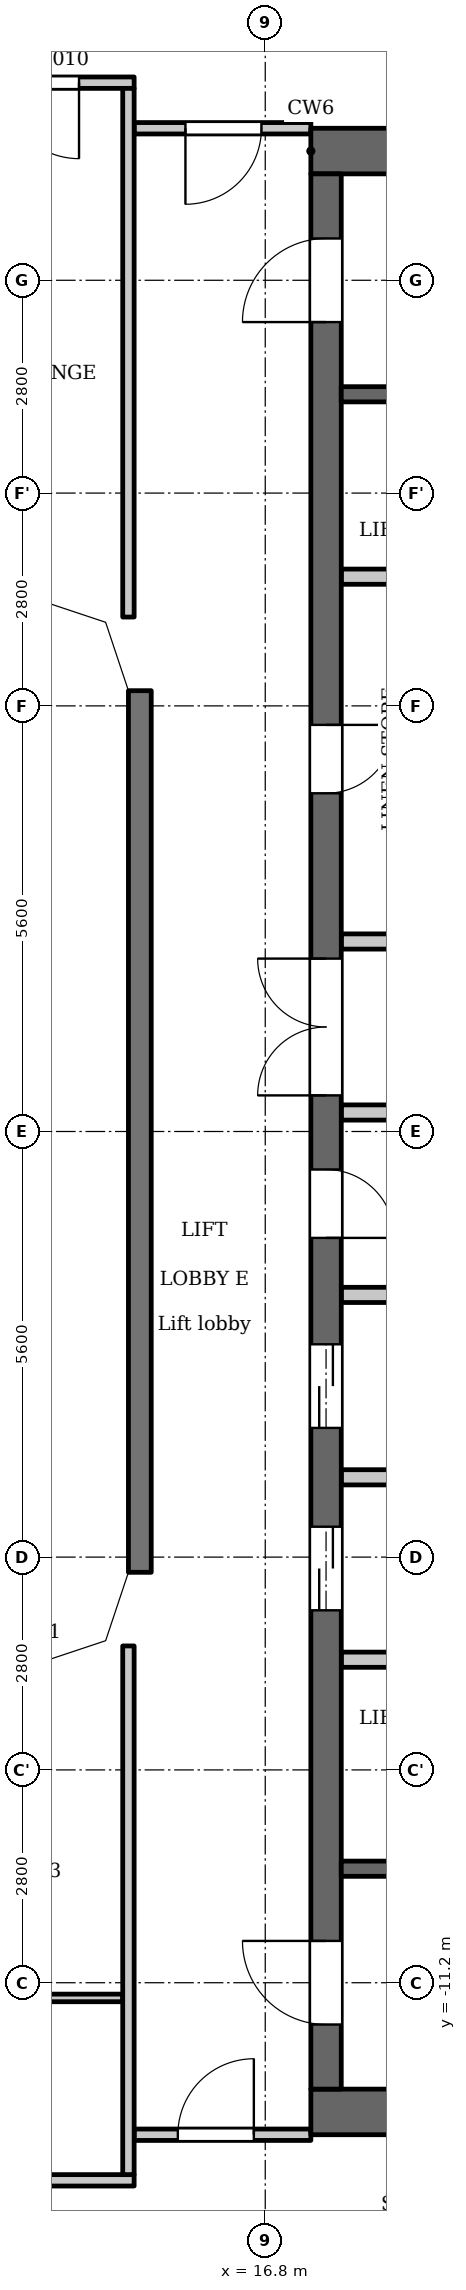
"""IFC4 building model, lengths in metres.
Left out: names, types, materials, properties, quantities, classifications, styles, units other than length and angle.
Written with IfcOpenShell. Run it as: python <this file> out.ifc"""

import sys

from ifc_helpers import new_model, si_unit, direction, frame, frame_2d, origin, place, context, subcontext, project, spatial, polyline, rectangle, outline, extrude, element, fill, save


model = new_model("IFC4")
c1 = context("Model", 3, precision=1e-05, world=origin(), true_north=direction((0.0, 1.0)))
c2 = subcontext(c1, "Body", "Model", "MODEL_VIEW")
j1 = project(units=[si_unit("LENGTHUNIT", "METRE"), si_unit("PLANEANGLEUNIT", "RADIAN")], contexts=[c1])
p1 = place(None, origin())
s1 = spatial("IfcSite", under=j1, at=p1, CompositionType="ELEMENT")
p2 = place(p1, origin())
s2 = spatial("IfcBuilding", under=s1, at=p2, CompositionType="ELEMENT")
p3 = place(p2, frame((0.0, 0.0, 262.7)))
s3 = spatial("IfcBuildingStorey", under=s2, at=p3, CompositionType="ELEMENT", Elevation=262.7)
p4 = place(p3, frame((15.15, 5.8, 0.0), z_axis=(0.0, 0.0, 1.0), x_axis=(0.0, -1.0, 0.0)))
e1 = element("IfcWall", 1, at=p4, inside=s3, PredefinedType="SOLIDWALL", context=c2, shape_type="SweptSolid", body=[
    extrude(rectangle(XDim=11.6, YDim=0.3, at=frame_2d((5.8, 0.0))), origin(), (0.0, 0.0, 1.0), 3.2),
])
for number, where, z_axis, x_axis in (
    (2, (17.4, 12.9, 0.0), (0.0, 0.0, 1.0), (1.0, 0.0, 0.0)),
    (3, (17.4, -12.9, 0.0), (0.0, 0.0, 1.0), (1.0, 0.0, 0.0)),
):
    element("IfcWall", number, at=place(p3, frame(where, z_axis=z_axis, x_axis=x_axis)), inside=s3, PredefinedType="SHEAR", context=c2, shape_type="SweptSolid", body=[
        extrude(rectangle(XDim=7.32, YDim=0.6, at=frame_2d((3.66, 0.0))), origin(), (0.0, 0.0, 1.0), 3.2),
    ])
p5 = place(p3, frame((17.6, -12.6, 0.0), z_axis=(0.0, 0.0, 1.0), x_axis=(0.0, 1.0, 0.0)))
e4 = element("IfcWall", 4, at=p5, inside=s3, PredefinedType="SHEAR", context=c2, shape_type="SweptSolid", body=[
    extrude(rectangle(XDim=25.2, YDim=0.4, at=frame_2d((12.6, 0.0))), origin(), (0.0, 0.0, 1.0), 3.2),
])
p6 = place(p5, frame((6.3, 0.0, 0.0)))
e5 = element("IfcOpeningElement", 5, at=p6, cuts=e4, PredefinedType="OPENING", context=c2, shape_type="SweptSolid", body=[
    extrude(rectangle(XDim=1.1, YDim=2.1, at=frame_2d((0.55, 1.05))), frame((0.0, 0.21, 0.0), z_axis=(0.0, -1.0, 0.0), x_axis=(1.0, 0.0, 0.0)), (0.0, 0.0, 1.0), 0.42),
])
p7 = place(p5, frame((8.7, 0.0, 0.0)))
e6 = element("IfcOpeningElement", 6, at=p7, cuts=e4, PredefinedType="OPENING", context=c2, shape_type="SweptSolid", body=[
    extrude(rectangle(XDim=1.1, YDim=2.1, at=frame_2d((0.55, 1.05))), frame((0.0, 0.21, 0.0), z_axis=(0.0, -1.0, 0.0), x_axis=(1.0, 0.0, 0.0)), (0.0, 0.0, 1.0), 0.42),
])
p8 = place(p5, frame((11.2, 0.0, 0.0)))
e7 = element("IfcOpeningElement", 7, at=p8, cuts=e4, PredefinedType="OPENING", context=c2, shape_type="SweptSolid", body=[
    extrude(rectangle(XDim=0.9, YDim=2.1, at=frame_2d((0.45, 1.05))), frame((0.0, 0.21, 0.0), z_axis=(0.0, -1.0, 0.0), x_axis=(1.0, 0.0, 0.0)), (0.0, 0.0, 1.0), 0.42),
])
p9 = place(p5, frame((17.05, 0.0, 0.0)))
e8 = element("IfcOpeningElement", 8, at=p9, cuts=e4, PredefinedType="OPENING", context=c2, shape_type="SweptSolid", body=[
    extrude(rectangle(XDim=0.9, YDim=2.1, at=frame_2d((0.45, 1.05))), frame((0.0, 0.21, 0.0), z_axis=(0.0, -1.0, 0.0), x_axis=(1.0, 0.0, 0.0)), (0.0, 0.0, 1.0), 0.42),
])
p10 = place(p5, frame((23.25, 0.0, 0.0)))
e9 = element("IfcOpeningElement", 9, at=p10, cuts=e4, PredefinedType="OPENING", context=c2, shape_type="SweptSolid", body=[
    extrude(rectangle(XDim=1.1, YDim=2.1, at=frame_2d((0.55, 1.05))), frame((0.0, 0.21, 0.0), z_axis=(0.0, -1.0, 0.0), x_axis=(1.0, 0.0, 0.0)), (0.0, 0.0, 1.0), 0.42),
])
p11 = place(p5, frame((0.85, 0.0, 0.0)))
e10 = element("IfcOpeningElement", 10, at=p11, cuts=e4, PredefinedType="OPENING", context=c2, shape_type="SweptSolid", body=[
    extrude(rectangle(XDim=1.1, YDim=2.1, at=frame_2d((0.55, 1.05))), frame((0.0, 0.21, 0.0), z_axis=(0.0, -1.0, 0.0), x_axis=(1.0, 0.0, 0.0)), (0.0, 0.0, 1.0), 0.42),
])
p12 = place(p5, frame((13.075, 0.0, 0.0)))
e11 = element("IfcOpeningElement", 11, at=p12, cuts=e4, PredefinedType="OPENING", context=c2, shape_type="SweptSolid", body=[
    extrude(rectangle(XDim=1.8, YDim=2.1, at=frame_2d((0.9, 1.05))), frame((0.0, 0.21, 0.0), z_axis=(0.0, -1.0, 0.0), x_axis=(1.0, 0.0, 0.0)), (0.0, 0.0, 1.0), 0.42),
])
p13 = place(p3, frame((17.8, -9.7, 0.0), z_axis=(0.0, 0.0, 1.0), x_axis=(1.0, 0.0, 0.0)))
e12 = element("IfcWall", 12, at=p13, inside=s3, PredefinedType="SHEAR", context=c2, shape_type="SweptSolid", body=[
    extrude(rectangle(XDim=5.8, YDim=0.2, at=frame_2d((2.9, 0.0))), origin(), (0.0, 0.0, 1.0), 3.2),
])
p14 = place(p13, frame((0.85, 0.0, 0.0)))
e13 = element("IfcOpeningElement", 13, at=p14, cuts=e12, PredefinedType="OPENING", context=c2, shape_type="SweptSolid", body=[
    extrude(rectangle(XDim=1.1, YDim=2.1, at=frame_2d((0.55, 1.05))), frame((0.0, 0.11, 0.0), z_axis=(0.0, -1.0, 0.0), x_axis=(1.0, 0.0, 0.0)), (0.0, 0.0, 1.0), 0.22),
])
p15 = place(p13, frame((3.75, 0.0, 0.0)))
e14 = element("IfcOpeningElement", 14, at=p15, cuts=e12, PredefinedType="OPENING", context=c2, shape_type="SweptSolid", body=[
    extrude(rectangle(XDim=1.1, YDim=2.1, at=frame_2d((0.55, 1.05))), frame((0.0, 0.11, 0.0), z_axis=(0.0, -1.0, 0.0), x_axis=(1.0, 0.0, 0.0)), (0.0, 0.0, 1.0), 0.22),
])
for number, where, z_axis, x_axis in (
    (15, (17.8, -6.95, 0.0), (0.0, 0.0, 1.0), (1.0, 0.0, 0.0)),
    (16, (17.8, -4.55, 0.0), (0.0, 0.0, 1.0), (1.0, 0.0, 0.0)),
    (17, (17.8, -2.15, 0.0), (0.0, 0.0, 1.0), (1.0, 0.0, 0.0)),
):
    element("IfcWall", number, at=place(p3, frame(where, z_axis=z_axis, x_axis=x_axis)), inside=s3, PredefinedType="PARTITIONING", context=c2, shape_type="SweptSolid", body=[
        extrude(rectangle(XDim=2.8, YDim=0.2, at=frame_2d((1.4, 0.0))), origin(), (0.0, 0.0, 1.0), 3.2),
    ])
p16 = place(p3, frame((17.8, 0.25, 0.0), z_axis=(0.0, 0.0, 1.0), x_axis=(1.0, 0.0, 0.0)))
e18 = element("IfcWall", 18, at=p16, inside=s3, PredefinedType="PARTITIONING", context=c2, shape_type="SweptSolid", body=[
    extrude(rectangle(XDim=3.0, YDim=0.2, at=frame_2d((1.5, 0.0))), origin(), (0.0, 0.0, 1.0), 3.2),
])
p17 = place(p3, frame((17.8, 2.5, 0.0), z_axis=(0.0, 0.0, 1.0), x_axis=(1.0, 0.0, 0.0)))
e19 = element("IfcWall", 19, at=p17, inside=s3, PredefinedType="PARTITIONING", context=c2, shape_type="SweptSolid", body=[
    extrude(rectangle(XDim=3.0, YDim=0.2, at=frame_2d((1.5, 0.0))), origin(), (0.0, 0.0, 1.0), 3.2),
])
p18 = place(p17, frame((1.7, 0.0, 0.0)))
e20 = element("IfcOpeningElement", 20, at=p18, cuts=e19, PredefinedType="OPENING", context=c2, shape_type="SweptSolid", body=[
    extrude(rectangle(XDim=0.9, YDim=2.1, at=frame_2d((0.45, 1.05))), frame((0.0, 0.11, 0.0), z_axis=(0.0, -1.0, 0.0), x_axis=(1.0, 0.0, 0.0)), (0.0, 0.0, 1.0), 0.22),
])
p19 = place(p3, frame((17.8, 7.3, 0.0), z_axis=(0.0, 0.0, 1.0), x_axis=(1.0, 0.0, 0.0)))
e21 = element("IfcWall", 21, at=p19, inside=s3, PredefinedType="PARTITIONING", context=c2, shape_type="SweptSolid", body=[
    extrude(rectangle(XDim=2.8, YDim=0.2, at=frame_2d((1.4, 0.0))), origin(), (0.0, 0.0, 1.0), 3.2),
])
p20 = place(p3, frame((17.8, 9.7, 0.0), z_axis=(0.0, 0.0, 1.0), x_axis=(1.0, 0.0, 0.0)))
e22 = element("IfcWall", 22, at=p20, inside=s3, PredefinedType="SHEAR", context=c2, shape_type="SweptSolid", body=[
    extrude(rectangle(XDim=5.8, YDim=0.2, at=frame_2d((2.9, 0.0))), origin(), (0.0, 0.0, 1.0), 3.2),
])
p21 = place(p20, frame((0.85, 0.0, 0.0)))
e23 = element("IfcOpeningElement", 23, at=p21, cuts=e22, PredefinedType="OPENING", context=c2, shape_type="SweptSolid", body=[
    extrude(rectangle(XDim=1.1, YDim=2.1, at=frame_2d((0.55, 1.05))), frame((0.0, 0.11, 0.0), z_axis=(0.0, -1.0, 0.0), x_axis=(1.0, 0.0, 0.0)), (0.0, 0.0, 1.0), 0.22),
])
p22 = place(p20, frame((3.75, 0.0, 0.0)))
e24 = element("IfcOpeningElement", 24, at=p22, cuts=e22, PredefinedType="OPENING", context=c2, shape_type="SweptSolid", body=[
    extrude(rectangle(XDim=1.1, YDim=2.1, at=frame_2d((0.55, 1.05))), frame((0.0, 0.11, 0.0), z_axis=(0.0, -1.0, 0.0), x_axis=(1.0, 0.0, 0.0)), (0.0, 0.0, 1.0), 0.22),
])
p23 = place(p3, frame((-15.075, -13.8, 0.0), z_axis=(0.0, 0.0, 1.0), x_axis=(1.0, 0.0, 0.0)))
e25 = element("IfcWall", 25, at=p23, inside=s3, PredefinedType="PARTITIONING", context=c2, shape_type="SweptSolid", body=[
    extrude(rectangle(XDim=30.15, YDim=0.15, at=frame_2d((15.075, 0.0))), origin(), (0.0, 0.0, 1.0), 3.2),
])
p24 = place(p23, frame((2.225, 0.0, 0.0)))
e26 = element("IfcOpeningElement", 26, at=p24, cuts=e25, PredefinedType="OPENING", context=c2, shape_type="SweptSolid", body=[
    extrude(rectangle(XDim=1.0, YDim=2.1, at=frame_2d((0.5, 1.05))), frame((0.0, 0.085, 0.0), z_axis=(0.0, -1.0, 0.0), x_axis=(1.0, 0.0, 0.0)), (0.0, 0.0, 1.0), 0.17),
])
p25 = place(p23, frame((10.825, 0.0, 0.0)))
e27 = element("IfcOpeningElement", 27, at=p25, cuts=e25, PredefinedType="OPENING", context=c2, shape_type="SweptSolid", body=[
    extrude(rectangle(XDim=1.0, YDim=2.1, at=frame_2d((0.5, 1.05))), frame((0.0, 0.085, 0.0), z_axis=(0.0, -1.0, 0.0), x_axis=(1.0, 0.0, 0.0)), (0.0, 0.0, 1.0), 0.17),
])
p26 = place(p23, frame((15.775, 0.0, 0.0)))
e28 = element("IfcOpeningElement", 28, at=p26, cuts=e25, PredefinedType="OPENING", context=c2, shape_type="SweptSolid", body=[
    extrude(rectangle(XDim=1.0, YDim=2.1, at=frame_2d((0.5, 1.05))), frame((0.0, 0.085, 0.0), z_axis=(0.0, -1.0, 0.0), x_axis=(1.0, 0.0, 0.0)), (0.0, 0.0, 1.0), 0.17),
])
p27 = place(p3, frame((15.075, -13.2, 0.0), z_axis=(0.0, 0.0, 1.0), x_axis=(1.0, 0.0, 0.0)))
e29 = element("IfcWall", 29, at=p27, inside=s3, PredefinedType="PARTITIONING", context=c2, shape_type="SweptSolid", body=[
    extrude(rectangle(XDim=2.325, YDim=0.15, at=frame_2d((1.163, 0.0))), origin(), (0.0, 0.0, 1.0), 3.2),
])
p28 = place(p27, frame((0.575, 0.0, 0.0)))
e30 = element("IfcOpeningElement", 30, at=p28, cuts=e29, PredefinedType="OPENING", context=c2, shape_type="SweptSolid", body=[
    extrude(rectangle(XDim=1.0, YDim=2.1, at=frame_2d((0.5, 1.05))), frame((0.0, 0.085, 0.0), z_axis=(0.0, -1.0, 0.0), x_axis=(1.0, 0.0, 0.0)), (0.0, 0.0, 1.0), 0.17),
])
p29 = place(p3, frame((-14.925, -11.4, 0.0), z_axis=(0.0, 0.0, 1.0), x_axis=(1.0, 0.0, 0.0)))
e31 = element("IfcWall", 31, at=p29, inside=s3, PredefinedType="PARTITIONING", context=c2, shape_type="SweptSolid", body=[
    extrude(rectangle(XDim=29.85, YDim=0.1, at=frame_2d((14.925, 0.0))), origin(), (0.0, 0.0, 1.0), 3.2),
])
p30 = place(p29, frame((7.875, 0.0, 0.0)))
e32 = element("IfcOpeningElement", 32, at=p30, cuts=e31, PredefinedType="OPENING", context=c2, shape_type="SweptSolid", body=[
    extrude(rectangle(XDim=0.8, YDim=2.1, at=frame_2d((0.4, 1.05))), frame((0.0, 0.06, 0.0), z_axis=(0.0, -1.0, 0.0), x_axis=(1.0, 0.0, 0.0)), (0.0, 0.0, 1.0), 0.12),
])
p31 = place(p29, frame((1.175, 0.0, 0.0)))
e33 = element("IfcOpeningElement", 33, at=p31, cuts=e31, PredefinedType="OPENING", context=c2, shape_type="SweptSolid", body=[
    extrude(rectangle(XDim=0.9, YDim=2.1, at=frame_2d((0.45, 1.05))), frame((0.0, 0.06, 0.0), z_axis=(0.0, -1.0, 0.0), x_axis=(1.0, 0.0, 0.0)), (0.0, 0.0, 1.0), 0.12),
])
p32 = place(p29, frame((13.475, 0.0, 0.0)))
e34 = element("IfcOpeningElement", 34, at=p32, cuts=e31, PredefinedType="OPENING", context=c2, shape_type="SweptSolid", body=[
    extrude(rectangle(XDim=0.8, YDim=2.1, at=frame_2d((0.4, 1.05))), frame((0.0, 0.06, 0.0), z_axis=(0.0, -1.0, 0.0), x_axis=(1.0, 0.0, 0.0)), (0.0, 0.0, 1.0), 0.12),
])
p33 = place(p29, frame((9.775, 0.0, 0.0)))
e35 = element("IfcOpeningElement", 35, at=p33, cuts=e31, PredefinedType="OPENING", context=c2, shape_type="SweptSolid", body=[
    extrude(rectangle(XDim=0.9, YDim=2.1, at=frame_2d((0.45, 1.05))), frame((0.0, 0.06, 0.0), z_axis=(0.0, -1.0, 0.0), x_axis=(1.0, 0.0, 0.0)), (0.0, 0.0, 1.0), 0.12),
])
p34 = place(p29, frame((16.675, 0.0, 0.0)))
e36 = element("IfcOpeningElement", 36, at=p34, cuts=e31, PredefinedType="OPENING", context=c2, shape_type="SweptSolid", body=[
    extrude(rectangle(XDim=0.9, YDim=2.1, at=frame_2d((0.45, 1.05))), frame((0.0, 0.06, 0.0), z_axis=(0.0, -1.0, 0.0), x_axis=(1.0, 0.0, 0.0)), (0.0, 0.0, 1.0), 0.12),
])
p35 = place(p29, frame((18.225, 0.0, 0.0)))
e37 = element("IfcOpeningElement", 37, at=p35, cuts=e31, PredefinedType="OPENING", context=c2, shape_type="SweptSolid", body=[
    extrude(rectangle(XDim=0.9, YDim=2.1, at=frame_2d((0.45, 1.05))), frame((0.0, 0.06, 0.0), z_axis=(0.0, -1.0, 0.0), x_axis=(1.0, 0.0, 0.0)), (0.0, 0.0, 1.0), 0.12),
])
p36 = place(p29, frame((24.325, 0.0, 0.0)))
e38 = element("IfcOpeningElement", 38, at=p36, cuts=e31, PredefinedType="OPENING", context=c2, shape_type="SweptSolid", body=[
    extrude(rectangle(XDim=0.9, YDim=2.1, at=frame_2d((0.45, 1.05))), frame((0.0, 0.06, 0.0), z_axis=(0.0, -1.0, 0.0), x_axis=(1.0, 0.0, 0.0)), (0.0, 0.0, 1.0), 0.12),
])
p37 = place(p3, frame((15.075, 13.2, 0.0), z_axis=(0.0, 0.0, 1.0), x_axis=(1.0, 0.0, 0.0)))
e39 = element("IfcWall", 39, at=p37, inside=s3, PredefinedType="PARTITIONING", context=c2, shape_type="SweptSolid", body=[
    extrude(rectangle(XDim=2.325, YDim=0.15, at=frame_2d((1.163, 0.0))), origin(), (0.0, 0.0, 1.0), 3.2),
])
p38 = place(p37, frame((0.675, 0.0, 0.0)))
e40 = element("IfcOpeningElement", 40, at=p38, cuts=e39, PredefinedType="OPENING", context=c2, shape_type="SweptSolid", body=[
    extrude(rectangle(XDim=1.0, YDim=2.1, at=frame_2d((0.5, 1.05))), frame((0.0, 0.085, 0.0), z_axis=(0.0, -1.0, 0.0), x_axis=(1.0, 0.0, 0.0)), (0.0, 0.0, 1.0), 0.17),
])
p39 = place(p3, frame((-15.075, 13.8, 0.0), z_axis=(0.0, 0.0, 1.0), x_axis=(1.0, 0.0, 0.0)))
e41 = element("IfcWall", 41, at=p39, inside=s3, PredefinedType="PARTITIONING", context=c2, shape_type="SweptSolid", body=[
    extrude(rectangle(XDim=30.15, YDim=0.15, at=frame_2d((15.075, 0.0))), origin(), (0.0, 0.0, 1.0), 3.2),
])
p40 = place(p39, frame((0.726, 0.0, 0.0)))
e42 = element("IfcOpeningElement", 42, at=p40, cuts=e41, PredefinedType="OPENING", context=c2, shape_type="SweptSolid", body=[
    extrude(rectangle(XDim=1.0, YDim=2.1, at=frame_2d((0.5, 1.05))), frame((0.0, 0.085, 0.0), z_axis=(0.0, -1.0, 0.0), x_axis=(1.0, 0.0, 0.0)), (0.0, 0.0, 1.0), 0.17),
])
p41 = place(p39, frame((7.775, 0.0, 0.0)))
e43 = element("IfcOpeningElement", 43, at=p41, cuts=e41, PredefinedType="OPENING", context=c2, shape_type="SweptSolid", body=[
    extrude(rectangle(XDim=1.0, YDim=2.1, at=frame_2d((0.5, 1.05))), frame((0.0, 0.085, 0.0), z_axis=(0.0, -1.0, 0.0), x_axis=(1.0, 0.0, 0.0)), (0.0, 0.0, 1.0), 0.17),
])
p42 = place(p39, frame((10.125, 0.0, 0.0)))
e44 = element("IfcOpeningElement", 44, at=p42, cuts=e41, PredefinedType="OPENING", context=c2, shape_type="SweptSolid", body=[
    extrude(rectangle(XDim=1.0, YDim=2.1, at=frame_2d((0.5, 1.05))), frame((0.0, 0.085, 0.0), z_axis=(0.0, -1.0, 0.0), x_axis=(1.0, 0.0, 0.0)), (0.0, 0.0, 1.0), 0.17),
])
p43 = place(p39, frame((18.975, 0.0, 0.0)))
e45 = element("IfcOpeningElement", 45, at=p43, cuts=e41, PredefinedType="OPENING", context=c2, shape_type="SweptSolid", body=[
    extrude(rectangle(XDim=1.0, YDim=2.1, at=frame_2d((0.5, 1.05))), frame((0.0, 0.085, 0.0), z_axis=(0.0, -1.0, 0.0), x_axis=(1.0, 0.0, 0.0)), (0.0, 0.0, 1.0), 0.17),
])
p44 = place(p39, frame((21.325, 0.0, 0.0)))
e46 = element("IfcOpeningElement", 46, at=p44, cuts=e41, PredefinedType="OPENING", context=c2, shape_type="SweptSolid", body=[
    extrude(rectangle(XDim=1.0, YDim=2.1, at=frame_2d((0.5, 1.05))), frame((0.0, 0.085, 0.0), z_axis=(0.0, -1.0, 0.0), x_axis=(1.0, 0.0, 0.0)), (0.0, 0.0, 1.0), 0.17),
])
p45 = place(p39, frame((28.425, 0.0, 0.0)))
e47 = element("IfcOpeningElement", 47, at=p45, cuts=e41, PredefinedType="OPENING", context=c2, shape_type="SweptSolid", body=[
    extrude(rectangle(XDim=1.0, YDim=2.1, at=frame_2d((0.5, 1.05))), frame((0.0, 0.085, 0.0), z_axis=(0.0, -1.0, 0.0), x_axis=(1.0, 0.0, 0.0)), (0.0, 0.0, 1.0), 0.17),
])
for number, where, z_axis, x_axis in (
    (48, (15.0, -13.725, 0.0), (0.0, 0.0, 1.0), (0.0, 1.0, 0.0)),
    (49, (15.0, 6.769, 0.0), (0.0, 0.0, 1.0), (0.0, 1.0, 0.0)),
):
    element("IfcWall", number, at=place(p3, frame(where, z_axis=z_axis, x_axis=x_axis)), inside=s3, PredefinedType="PARTITIONING", context=c2, shape_type="SweptSolid", body=[
        extrude(rectangle(XDim=6.956, YDim=0.15, at=frame_2d((3.478, 0.0))), origin(), (0.0, 0.0, 1.0), 3.2),
    ])
p46 = place(p3, origin())
e50 = element("IfcWall", 50, at=p46, inside=s3, PredefinedType="SOLIDWALL", context=c2, shape_type="SweptSolid", body=[
    extrude(outline(polyline([(14.937, 6.937), (13.849, 7.3), (13.8, 7.3), (13.8, 7.0), (14.7, 6.7), (15.0, 5.8), (15.3, 5.8), (15.3, 5.849), (14.937, 6.937)])), origin(), (0.0, 0.0, 1.0), 3.2),
])
e51 = element("IfcWall", 51, at=p46, inside=s3, PredefinedType="SOLIDWALL", context=c2, shape_type="SweptSolid", body=[
    extrude(outline(polyline([(14.937, -6.937), (15.3, -5.849), (15.3, -5.8), (15.0, -5.8), (14.7, -6.7), (13.8, -7.0), (13.8, -7.3), (13.849, -7.3), (14.937, -6.937)])), origin(), (0.0, 0.0, 1.0), 3.2),
])
p47 = place(p6, origin())
e52 = element("IfcDoor", 52, at=p47, inside=s3, OperationType="DOUBLE_DOOR_SLIDING", PredefinedType="DOOR", context=c2, shape_type="SweptSolid", body=[
    extrude(rectangle(XDim=1.1, YDim=2.1, at=frame_2d((0.55, 1.05))), frame((0.0, 0.025, 0.0), z_axis=(0.0, -1.0, 0.0), x_axis=(1.0, 0.0, 0.0)), (0.0, 0.0, 1.0), 0.05),
])
fill(e5, e52)
p48 = place(p7, origin())
e53 = element("IfcDoor", 53, at=p48, inside=s3, OperationType="DOUBLE_DOOR_SLIDING", PredefinedType="DOOR", context=c2, shape_type="SweptSolid", body=[
    extrude(rectangle(XDim=1.1, YDim=2.1, at=frame_2d((0.55, 1.05))), frame((0.0, 0.025, 0.0), z_axis=(0.0, -1.0, 0.0), x_axis=(1.0, 0.0, 0.0)), (0.0, 0.0, 1.0), 0.05),
])
fill(e6, e53)
p49 = place(p8, origin())
e54 = element("IfcDoor", 54, at=p49, inside=s3, OperationType="SINGLE_SWING_LEFT", PredefinedType="DOOR", context=c2, shape_type="SweptSolid", body=[
    extrude(rectangle(XDim=0.9, YDim=2.1, at=frame_2d((0.45, 1.05))), frame((0.0, 0.025, 0.0), z_axis=(0.0, -1.0, 0.0), x_axis=(1.0, 0.0, 0.0)), (0.0, 0.0, 1.0), 0.05),
])
fill(e7, e54)
p50 = place(p9, origin())
e55 = element("IfcDoor", 55, at=p50, inside=s3, OperationType="SINGLE_SWING_RIGHT", PredefinedType="DOOR", context=c2, shape_type="SweptSolid", body=[
    extrude(rectangle(XDim=0.9, YDim=2.1, at=frame_2d((0.45, 1.05))), frame((0.0, 0.025, 0.0), z_axis=(0.0, -1.0, 0.0), x_axis=(1.0, 0.0, 0.0)), (0.0, 0.0, 1.0), 0.05),
])
fill(e8, e55)
p51 = place(p10, origin())
e56 = element("IfcDoor", 56, at=p51, inside=s3, OperationType="SINGLE_SWING_RIGHT", PredefinedType="DOOR", context=c2, shape_type="SweptSolid", body=[
    extrude(rectangle(XDim=1.1, YDim=2.1, at=frame_2d((0.55, 1.05))), frame((0.0, 0.025, 0.0), z_axis=(0.0, -1.0, 0.0), x_axis=(1.0, 0.0, 0.0)), (0.0, 0.0, 1.0), 0.05),
])
fill(e9, e56)
p52 = place(p11, origin())
e57 = element("IfcDoor", 57, at=p52, inside=s3, OperationType="SINGLE_SWING_LEFT", PredefinedType="DOOR", context=c2, shape_type="SweptSolid", body=[
    extrude(rectangle(XDim=1.1, YDim=2.1, at=frame_2d((0.55, 1.05))), frame((0.0, 0.025, 0.0), z_axis=(0.0, -1.0, 0.0), x_axis=(1.0, 0.0, 0.0)), (0.0, 0.0, 1.0), 0.05),
])
fill(e10, e57)
p53 = place(p12, origin())
e58 = element("IfcDoor", 58, at=p53, inside=s3, OperationType="DOUBLE_DOOR_SINGLE_SWING", PredefinedType="DOOR", context=c2, shape_type="SweptSolid", body=[
    extrude(rectangle(XDim=1.8, YDim=2.1, at=frame_2d((0.9, 1.05))), frame((0.0, 0.025, 0.0), z_axis=(0.0, -1.0, 0.0), x_axis=(1.0, 0.0, 0.0)), (0.0, 0.0, 1.0), 0.05),
])
fill(e11, e58)
p54 = place(p38, origin())
e59 = element("IfcDoor", 59, at=p54, inside=s3, OperationType="SINGLE_SWING_LEFT", PredefinedType="DOOR", context=c2, shape_type="SweptSolid", body=[
    extrude(rectangle(XDim=1.0, YDim=2.1, at=frame_2d((0.5, 1.05))), frame((0.0, 0.025, 0.0), z_axis=(0.0, -1.0, 0.0), x_axis=(1.0, 0.0, 0.0)), (0.0, 0.0, 1.0), 0.05),
])
fill(e40, e59)
p55 = place(p28, origin())
e60 = element("IfcDoor", 60, at=p55, inside=s3, OperationType="SINGLE_SWING_LEFT", PredefinedType="DOOR", context=c2, shape_type="SweptSolid", body=[
    extrude(rectangle(XDim=1.0, YDim=2.1, at=frame_2d((0.5, 1.05))), frame((0.0, 0.025, 0.0), z_axis=(0.0, -1.0, 0.0), x_axis=(1.0, 0.0, 0.0)), (0.0, 0.0, 1.0), 0.05),
])
fill(e30, e60)
p56 = place(p45, origin())
e61 = element("IfcDoor", 61, at=p56, inside=s3, OperationType="SINGLE_SWING_RIGHT", PredefinedType="DOOR", context=c2, shape_type="SweptSolid", body=[
    extrude(rectangle(XDim=1.0, YDim=2.1, at=frame_2d((0.5, 1.05))), frame((0.0, 0.025, 0.0), z_axis=(0.0, -1.0, 0.0), x_axis=(1.0, 0.0, 0.0)), (0.0, 0.0, 1.0), 0.05),
])
fill(e47, e61)
save(model, sys.argv[1])
